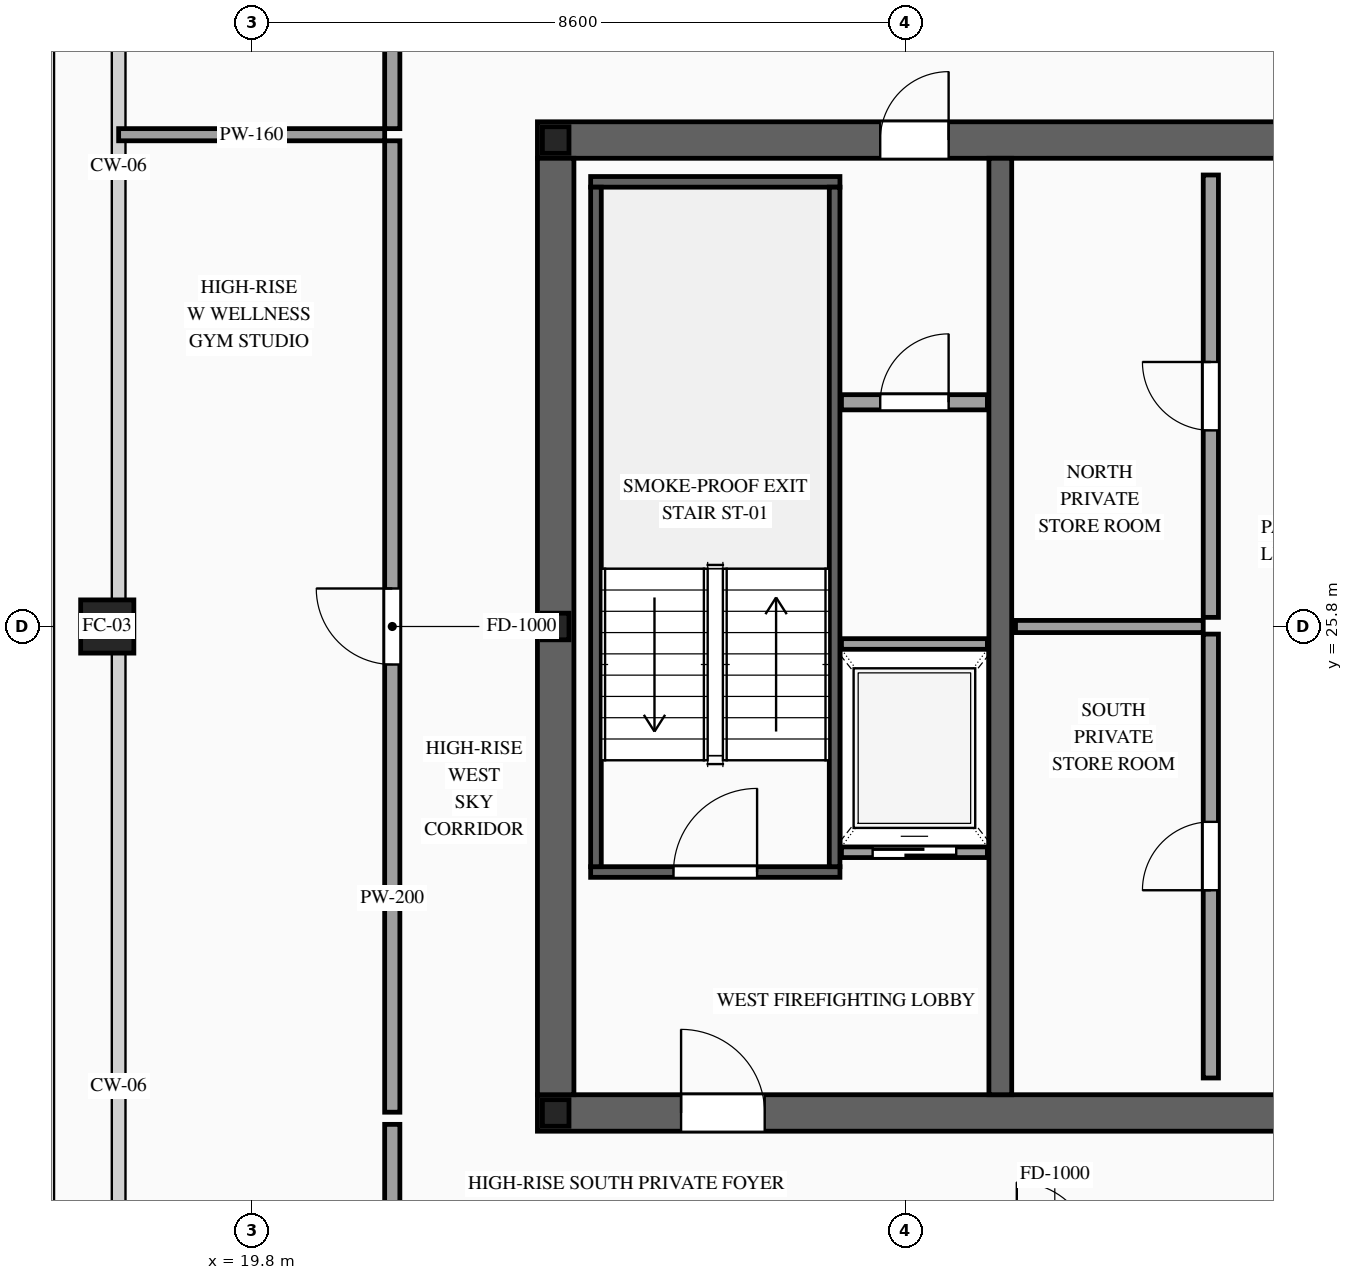
"""IFC4 building model, lengths in metres.
Left out: names, types, materials, properties, quantities, classifications, styles, units other than length and angle.
Written with IfcOpenShell. Run it as: python <this file> out.ifc"""

import sys

from ifc_helpers import new_model, si_unit, direction, frame, frame_2d, origin, origin_2d, place, context, subcontext, project, spatial, rectangle, hollow_rectangle, i_section, extrude, source, transform, mapped, element, fill, save


model = new_model("IFC4")
c1 = context("Model", 3, precision=1e-05, world=origin(), true_north=direction((0.0, 1.0)))
c2 = subcontext(c1, "Body", "Model", "MODEL_VIEW")
j1 = project(units=[si_unit("LENGTHUNIT", "METRE"), si_unit("PLANEANGLEUNIT", "RADIAN")], contexts=[c1])
p1 = place(None, origin())
s1 = spatial("IfcSite", under=j1, at=p1, CompositionType="ELEMENT")
p2 = place(p1, origin())
s2 = spatial("IfcBuilding", under=s1, at=p2, CompositionType="ELEMENT")
p3 = place(p2, frame((0.0, 0.0, 299.6)))
s3 = spatial("IfcBuildingStorey", under=s2, at=p3, CompositionType="ELEMENT", Elevation=299.6)
p4 = place(p3, frame((23.56, 19.4, 0.0), z_axis=(0.0, 0.0, 1.0), x_axis=(1.0, 0.0, 0.0)))
e1 = element("IfcWall", 1, at=p4, inside=s3, PredefinedType="SHEAR", context=c2, shape_type="SweptSolid", body=[
    extrude(rectangle(XDim=26.88, YDim=0.48, at=frame_2d((13.44, 0.0))), origin(), (0.0, 0.0, 1.0), 3.5),
])
p5 = place(p4, frame((1.89, 0.0, 0.0)))
e2 = element("IfcOpeningElement", 2, at=p5, cuts=e1, PredefinedType="OPENING", context=c2, shape_type="SweptSolid", body=[
    extrude(rectangle(XDim=1.1, YDim=2.2, at=frame_2d((0.55, 1.1))), frame((0.0, 0.255, 0.0), z_axis=(0.0, -1.0, 0.0), x_axis=(1.0, 0.0, 0.0)), (0.0, 0.0, 1.0), 0.51),
])
p6 = place(p4, frame((9.79, 0.0, 0.0)))
e3 = element("IfcOpeningElement", 3, at=p6, cuts=e1, PredefinedType="OPENING", context=c2, shape_type="SweptSolid", body=[
    extrude(rectangle(XDim=1.1, YDim=2.2, at=frame_2d((0.55, 1.1))), frame((0.0, 0.255, 0.0), z_axis=(0.0, -1.0, 0.0), x_axis=(1.0, 0.0, 0.0)), (0.0, 0.0, 1.0), 0.51),
])
p7 = place(p4, frame((22.99, 0.0, 0.0)))
e4 = element("IfcOpeningElement", 4, at=p7, cuts=e1, PredefinedType="OPENING", context=c2, shape_type="SweptSolid", body=[
    extrude(rectangle(XDim=1.1, YDim=2.2, at=frame_2d((0.55, 1.1))), frame((0.0, 0.255, 0.0), z_axis=(0.0, -1.0, 0.0), x_axis=(1.0, 0.0, 0.0)), (0.0, 0.0, 1.0), 0.51),
])
p8 = place(p4, frame((19.61, 0.0, 0.0)))
e5 = element("IfcOpeningElement", 5, at=p8, cuts=e1, PredefinedType="OPENING", context=c2, shape_type="SweptSolid", body=[
    extrude(rectangle(XDim=0.9, YDim=2.15, at=frame_2d((0.45, 1.075))), frame((0.0, 0.255, 0.0), z_axis=(0.0, -1.0, 0.0), x_axis=(1.0, 0.0, 0.0)), (0.0, 0.0, 1.0), 0.51),
])
p9 = place(p4, frame((18.17, 0.0, 0.0)))
e6 = element("IfcOpeningElement", 6, at=p9, cuts=e1, PredefinedType="OPENING", context=c2, shape_type="SweptSolid", body=[
    extrude(rectangle(XDim=0.9, YDim=2.15, at=frame_2d((0.45, 1.075))), frame((0.0, 0.255, 0.0), z_axis=(0.0, -1.0, 0.0), x_axis=(1.0, 0.0, 0.0)), (0.0, 0.0, 1.0), 0.51),
])
p10 = place(p3, frame((23.56, 32.2, 0.0), z_axis=(0.0, 0.0, 1.0), x_axis=(1.0, 0.0, 0.0)))
e7 = element("IfcWall", 7, at=p10, inside=s3, PredefinedType="SHEAR", context=c2, shape_type="SweptSolid", body=[
    extrude(rectangle(XDim=26.88, YDim=0.48, at=frame_2d((13.44, 0.0))), origin(), (0.0, 0.0, 1.0), 3.5),
])
p11 = place(p10, frame((4.51, 0.0, 0.0)))
e8 = element("IfcOpeningElement", 8, at=p11, cuts=e7, PredefinedType="OPENING", context=c2, shape_type="SweptSolid", body=[
    extrude(rectangle(XDim=0.9, YDim=2.15, at=frame_2d((0.45, 1.075))), frame((0.0, 0.255, 0.0), z_axis=(0.0, -1.0, 0.0), x_axis=(1.0, 0.0, 0.0)), (0.0, 0.0, 1.0), 0.51),
])
p12 = place(p10, frame((9.79, 0.0, 0.0)))
e9 = element("IfcOpeningElement", 9, at=p12, cuts=e7, PredefinedType="OPENING", context=c2, shape_type="SweptSolid", body=[
    extrude(rectangle(XDim=1.1, YDim=2.2, at=frame_2d((0.55, 1.1))), frame((0.0, 0.255, 0.0), z_axis=(0.0, -1.0, 0.0), x_axis=(1.0, 0.0, 0.0)), (0.0, 0.0, 1.0), 0.51),
])
p13 = place(p10, frame((15.64, 0.0, 0.0)))
e10 = element("IfcOpeningElement", 10, at=p13, cuts=e7, PredefinedType="OPENING", context=c2, shape_type="SweptSolid", body=[
    extrude(rectangle(XDim=1.1, YDim=2.2, at=frame_2d((0.55, 1.1))), frame((0.0, 0.255, 0.0), z_axis=(0.0, -1.0, 0.0), x_axis=(1.0, 0.0, 0.0)), (0.0, 0.0, 1.0), 0.51),
])
p14 = place(p10, frame((18.74, 0.0, 0.0)))
e11 = element("IfcOpeningElement", 11, at=p14, cuts=e7, PredefinedType="OPENING", context=c2, shape_type="SweptSolid", body=[
    extrude(rectangle(XDim=1.1, YDim=2.2, at=frame_2d((0.55, 1.1))), frame((0.0, 0.255, 0.0), z_axis=(0.0, -1.0, 0.0), x_axis=(1.0, 0.0, 0.0)), (0.0, 0.0, 1.0), 0.51),
])
m1 = source(origin(), c2, "Body", "SweptSolid", [
    extrude(rectangle(XDim=12.32, YDim=0.48, at=frame_2d((6.16, 0.0))), origin(), (0.0, 0.0, 1.0), 3.5),
])
p15 = place(p3, frame((23.8, 19.64, 0.0), z_axis=(0.0, 0.0, 1.0), x_axis=(0.0, 1.0, 0.0)))
e12 = element("IfcWall", 12, at=p15, inside=s3, PredefinedType="SHEAR", context=c2, shape_type="MappedRepresentation", body=[
    mapped(m1, transform((0.0, 0.0, 0.0), scale=1.0)),
])
m2 = source(origin(), c2, "Body", "SweptSolid", [
    extrude(rectangle(XDim=12.32, YDim=0.3, at=frame_2d((6.16, 0.0))), origin(), (0.0, 0.0, 1.0), 3.5),
])
p16 = place(p3, frame((29.65, 19.64, 0.0), z_axis=(0.0, 0.0, 1.0), x_axis=(0.0, 1.0, 0.0)))
e13 = element("IfcWall", 13, at=p16, inside=s3, PredefinedType="SOLIDWALL", context=c2, shape_type="MappedRepresentation", body=[
    mapped(m2, transform((0.0, 0.0, 0.0), scale=1.0)),
])
m3 = source(origin(), c2, "Body", "SweptSolid", [
    extrude(i_section(OverallWidth=0.35, OverallDepth=0.35, WebThickness=0.012, FlangeThickness=0.019, at=origin_2d()), origin(), (0.0, 0.0, 1.0), 3.5),
])
for number, where, z_axis, x_axis in (
    (14, (23.8, 19.4, 0.0), (0.0, 0.0, 1.0), (1.0, 0.0, 0.0)),
    (15, (23.8, 25.8, 0.0), (0.0, 0.0, 1.0), (1.0, 0.0, 0.0)),
    (16, (23.8, 32.2, 0.0), (0.0, 0.0, 1.0), (1.0, 0.0, 0.0)),
):
    element("IfcColumn", number, at=place(p3, frame(where, z_axis=z_axis, x_axis=x_axis)), inside=s3, PredefinedType="COLUMN", context=c2, shape_type="MappedRepresentation", body=[
        mapped(m3, transform((0.0, 0.0, 0.0), scale=1.0)),
    ])
m4 = source(origin(), c2, "Body", "SweptSolid", [
    extrude(hollow_rectangle(XDim=0.7, YDim=0.7, WallThickness=0.032, at=origin_2d()), origin(), (0.0, 0.0, 1.0), 3.5),
])
p17 = place(p3, frame((17.9, 25.8, 0.0), z_axis=(0.0, 0.0, 1.0), x_axis=(1.0, 0.0, 0.0)))
e17 = element("IfcColumn", 17, at=p17, inside=s3, PredefinedType="COLUMN", context=c2, shape_type="MappedRepresentation", body=[
    mapped(m4, transform((0.0, 0.0, 0.0), scale=1.0)),
])
p18 = place(p3, frame((27.56, 22.83, 0.0), z_axis=(0.0, 0.0, 1.0), x_axis=(1.0, 0.0, 0.0)))
e18 = element("IfcWall", 18, at=p18, inside=s3, PredefinedType="SOLIDWALL", context=c2, shape_type="SweptSolid", body=[
    extrude(rectangle(XDim=1.92, YDim=0.14, at=frame_2d((0.96, 0.0))), origin(), (0.0, 0.0, 1.0), 3.28),
])
p19 = place(p18, frame((0.41, 0.0, 0.0)))
e19 = element("IfcOpeningElement", 19, at=p19, cuts=e18, PredefinedType="OPENING", context=c2, shape_type="SweptSolid", body=[
    extrude(rectangle(XDim=1.1, YDim=2.2, at=frame_2d((0.55, 1.1))), frame((0.0, 0.085, 0.0), z_axis=(0.0, -1.0, 0.0), x_axis=(1.0, 0.0, 0.0)), (0.0, 0.0, 1.0), 0.17),
])
m5 = source(origin(), c2, "Body", "SweptSolid", [
    extrude(rectangle(XDim=1.92, YDim=0.14, at=frame_2d((0.96, 0.0))), origin(), (0.0, 0.0, 1.0), 3.28),
])
p20 = place(p3, frame((27.56, 25.57, 0.0), z_axis=(0.0, 0.0, 1.0), x_axis=(1.0, 0.0, 0.0)))
e20 = element("IfcWall", 20, at=p20, inside=s3, PredefinedType="SOLIDWALL", context=c2, shape_type="MappedRepresentation", body=[
    mapped(m5, transform((0.0, 0.0, 0.0), scale=1.0)),
])
p21 = place(p3, frame((24.26, 22.57, 0.0), z_axis=(0.0, 0.0, 1.0), x_axis=(1.0, 0.0, 0.0)))
e21 = element("IfcWall", 21, at=p21, inside=s3, PredefinedType="SOLIDWALL", context=c2, shape_type="SweptSolid", body=[
    extrude(rectangle(XDim=3.28, YDim=0.14, at=frame_2d((1.64, 0.0))), origin(), (0.0, 0.0, 1.0), 3.28),
])
p22 = place(p21, frame((1.09, 0.0, 0.0)))
e22 = element("IfcOpeningElement", 22, at=p22, cuts=e21, PredefinedType="OPENING", context=c2, shape_type="SweptSolid", body=[
    extrude(rectangle(XDim=1.1, YDim=2.2, at=frame_2d((0.55, 1.1))), frame((0.0, 0.085, 0.0), z_axis=(0.0, -1.0, 0.0), x_axis=(1.0, 0.0, 0.0)), (0.0, 0.0, 1.0), 0.17),
])
m6 = source(origin(), c2, "Body", "SweptSolid", [
    extrude(rectangle(XDim=3.28, YDim=0.14, at=frame_2d((1.64, 0.0))), origin(), (0.0, 0.0, 1.0), 3.28),
])
p23 = place(p3, frame((24.26, 31.65, 0.0), z_axis=(0.0, 0.0, 1.0), x_axis=(1.0, 0.0, 0.0)))
e23 = element("IfcWall", 23, at=p23, inside=s3, PredefinedType="SOLIDWALL", context=c2, shape_type="MappedRepresentation", body=[
    mapped(m6, transform((0.0, 0.0, 0.0), scale=1.0)),
])
m7 = source(origin(), c2, "Body", "SweptSolid", [
    extrude(rectangle(XDim=8.94, YDim=0.14, at=frame_2d((4.47, 0.0))), origin(), (0.0, 0.0, 1.0), 3.28),
])
for number, where, z_axis, x_axis in (
    (24, (24.33, 22.64, 0.0), (0.0, 0.0, 1.0), (0.0, 1.0, 0.0)),
    (25, (27.47, 22.64, 0.0), (0.0, 0.0, 1.0), (0.0, 1.0, 0.0)),
):
    element("IfcWall", number, at=place(p3, frame(where, z_axis=z_axis, x_axis=x_axis)), inside=s3, PredefinedType="SOLIDWALL", context=c2, shape_type="MappedRepresentation", body=[
        mapped(m7, transform((0.0, 0.0, 0.0), scale=1.0)),
    ])
p24 = place(p3, frame((27.56, 28.75, 0.0), z_axis=(0.0, 0.0, 1.0), x_axis=(1.0, 0.0, 0.0)))
e26 = element("IfcWall", 26, at=p24, inside=s3, PredefinedType="PARTITIONING", context=c2, shape_type="SweptSolid", body=[
    extrude(rectangle(XDim=1.92, YDim=0.2, at=frame_2d((0.96, 0.0))), origin(), (0.0, 0.0, 1.0), 3.28),
])
p25 = place(p24, frame((0.51, 0.0, 0.0)))
e27 = element("IfcOpeningElement", 27, at=p25, cuts=e26, PredefinedType="OPENING", context=c2, shape_type="SweptSolid", body=[
    extrude(rectangle(XDim=0.9, YDim=2.15, at=frame_2d((0.45, 1.075))), frame((0.0, 0.115, 0.0), z_axis=(0.0, -1.0, 0.0), x_axis=(1.0, 0.0, 0.0)), (0.0, 0.0, 1.0), 0.23),
])
p26 = place(p3, frame((32.42, 19.86, 0.0), z_axis=(0.0, 0.0, 1.0), x_axis=(0.0, 1.0, 0.0)))
e28 = element("IfcWall", 28, at=p26, inside=s3, PredefinedType="PARTITIONING", context=c2, shape_type="SweptSolid", body=[
    extrude(rectangle(XDim=5.84, YDim=0.2, at=frame_2d((2.92, 0.0))), origin(), (0.0, 0.0, 1.0), 3.28),
])
p27 = place(p26, frame((2.47, 0.0, 0.0)))
e29 = element("IfcOpeningElement", 29, at=p27, cuts=e28, PredefinedType="OPENING", context=c2, shape_type="SweptSolid", body=[
    extrude(rectangle(XDim=0.9, YDim=2.15, at=frame_2d((0.45, 1.075))), frame((0.0, 0.115, 0.0), z_axis=(0.0, -1.0, 0.0), x_axis=(1.0, 0.0, 0.0)), (0.0, 0.0, 1.0), 0.23),
])
p28 = place(p3, frame((32.42, 25.92, 0.0), z_axis=(0.0, 0.0, 1.0), x_axis=(0.0, 1.0, 0.0)))
e30 = element("IfcWall", 30, at=p28, inside=s3, PredefinedType="PARTITIONING", context=c2, shape_type="SweptSolid", body=[
    extrude(rectangle(XDim=5.82, YDim=0.2, at=frame_2d((2.91, 0.0))), origin(), (0.0, 0.0, 1.0), 3.28),
])
p29 = place(p28, frame((2.46, 0.0, 0.0)))
e31 = element("IfcOpeningElement", 31, at=p29, cuts=e30, PredefinedType="OPENING", context=c2, shape_type="SweptSolid", body=[
    extrude(rectangle(XDim=0.9, YDim=2.15, at=frame_2d((0.45, 1.075))), frame((0.0, 0.115, 0.0), z_axis=(0.0, -1.0, 0.0), x_axis=(1.0, 0.0, 0.0)), (0.0, 0.0, 1.0), 0.23),
])
m8 = source(origin(), c2, "Body", "SweptSolid", [
    extrude(rectangle(XDim=2.47, YDim=0.16, at=frame_2d((1.235, 0.0))), origin(), (0.0, 0.0, 1.0), 3.28),
])
p30 = place(p3, frame((29.85, 25.8, 0.0), z_axis=(0.0, 0.0, 1.0), x_axis=(1.0, 0.0, 0.0)))
e32 = element("IfcWall", 32, at=p30, inside=s3, PredefinedType="PARTITIONING", context=c2, shape_type="MappedRepresentation", body=[
    mapped(m8, transform((0.0, 0.0, 0.0), scale=1.0)),
])
m9 = source(origin(), c2, "Body", "SweptSolid", [
    extrude(rectangle(XDim=1.7, YDim=0.2, at=frame_2d((0.85, 0.0))), origin(), (0.0, 0.0, 1.0), 3.28),
])
for number, where, z_axis, x_axis in (
    (33, (21.65, 32.35, 0.0), (0.0, 0.0, 1.0), (0.0, 1.0, 0.0)),
    (34, (21.65, 17.55, 0.0), (0.0, 0.0, 1.0), (0.0, 1.0, 0.0)),
):
    element("IfcWall", number, at=place(p3, frame(where, z_axis=z_axis, x_axis=x_axis)), inside=s3, PredefinedType="PARTITIONING", context=c2, shape_type="MappedRepresentation", body=[
        mapped(m9, transform((0.0, 0.0, 0.0), scale=1.0)),
    ])
p31 = place(p3, frame((21.65, 19.41, 0.0), z_axis=(0.0, 0.0, 1.0), x_axis=(0.0, 1.0, 0.0)))
e35 = element("IfcWall", 35, at=p31, inside=s3, PredefinedType="PARTITIONING", context=c2, shape_type="SweptSolid", body=[
    extrude(rectangle(XDim=12.78, YDim=0.2, at=frame_2d((6.39, 0.0))), origin(), (0.0, 0.0, 1.0), 3.28),
])
p32 = place(p31, frame((5.89, 0.0, 0.0)))
e36 = element("IfcOpeningElement", 36, at=p32, cuts=e35, PredefinedType="OPENING", context=c2, shape_type="SweptSolid", body=[
    extrude(rectangle(XDim=1.0, YDim=2.2, at=frame_2d((0.5, 1.1))), frame((0.0, 0.115, 0.0), z_axis=(0.0, -1.0, 0.0), x_axis=(1.0, 0.0, 0.0)), (0.0, 0.0, 1.0), 0.23),
])
m10 = source(origin(), c2, "Body", "SweptSolid", [
    extrude(rectangle(XDim=3.5, YDim=0.16, at=frame_2d((1.75, 0.0))), origin(), (0.0, 0.0, 1.0), 2.825),
])
p33 = place(p3, frame((18.05, 32.27, 0.0), z_axis=(0.0, 0.0, 1.0), x_axis=(1.0, 0.0, 0.0)))
e37 = element("IfcWall", 37, at=p33, inside=s3, PredefinedType="PARTITIONING", context=c2, shape_type="MappedRepresentation", body=[
    mapped(m10, transform((0.0, 0.0, 0.0), scale=1.0)),
])
m11 = source(origin(), c2, "Body", "SweptSolid", [
    extrude(rectangle(XDim=1.1, YDim=2.2, at=frame_2d((0.55, 1.1))), frame((0.0, 0.025, 0.0), z_axis=(0.0, -1.0, 0.0), x_axis=(1.0, 0.0, 0.0)), (0.0, 0.0, 1.0), 0.05),
])
p34 = place(p19, origin())
e38 = element("IfcDoor", 38, at=p34, inside=s3, OperationType="SLIDING_TO_LEFT", PredefinedType="DOOR", context=c2, shape_type="MappedRepresentation", body=[
    mapped(m11, transform((0.0, 0.0, 0.0), scale=1.0)),
])
fill(e19, e38)
m12 = source(origin(), c2, "Body", "SweptSolid", [
    extrude(rectangle(XDim=1.1, YDim=2.2, at=frame_2d((0.55, 1.1))), frame((0.0, 0.025, 0.0), z_axis=(0.0, -1.0, 0.0), x_axis=(1.0, 0.0, 0.0)), (0.0, 0.0, 1.0), 0.05),
])
p35 = place(p22, origin())
e39 = element("IfcDoor", 39, at=p35, inside=s3, OperationType="SINGLE_SWING_RIGHT", PredefinedType="DOOR", context=c2, shape_type="MappedRepresentation", body=[
    mapped(m12, transform((0.0, 0.0, 0.0), scale=1.0)),
])
fill(e22, e39)
p36 = place(p5, origin())
e40 = element("IfcDoor", 40, at=p36, inside=s3, OperationType="SINGLE_SWING_LEFT", PredefinedType="DOOR", context=c2, shape_type="MappedRepresentation", body=[
    mapped(m12, transform((0.0, 0.0, 0.0), scale=1.0)),
])
fill(e2, e40)
m13 = source(origin(), c2, "Body", "SweptSolid", [
    extrude(rectangle(XDim=0.9, YDim=2.15, at=frame_2d((0.45, 1.075))), frame((0.0, 0.025, 0.0), z_axis=(0.0, -1.0, 0.0), x_axis=(1.0, 0.0, 0.0)), (0.0, 0.0, 1.0), 0.05),
])
p37 = place(p11, origin())
e41 = element("IfcDoor", 41, at=p37, inside=s3, OperationType="SINGLE_SWING_RIGHT", PredefinedType="DOOR", context=c2, shape_type="MappedRepresentation", body=[
    mapped(m13, transform((0.0, 0.0, 0.0), scale=1.0)),
])
fill(e8, e41)
p38 = place(p25, origin())
e42 = element("IfcDoor", 42, at=p38, inside=s3, OperationType="SINGLE_SWING_RIGHT", PredefinedType="DOOR", context=c2, shape_type="MappedRepresentation", body=[
    mapped(m13, transform((0.0, 0.0, 0.0), scale=1.0)),
])
fill(e27, e42)
p39 = place(p27, origin())
e43 = element("IfcDoor", 43, at=p39, inside=s3, OperationType="SINGLE_SWING_LEFT", PredefinedType="DOOR", context=c2, shape_type="MappedRepresentation", body=[
    mapped(m13, transform((0.0, 0.0, 0.0), scale=1.0)),
])
fill(e29, e43)
p40 = place(p29, origin())
e44 = element("IfcDoor", 44, at=p40, inside=s3, OperationType="SINGLE_SWING_RIGHT", PredefinedType="DOOR", context=c2, shape_type="MappedRepresentation", body=[
    mapped(m13, transform((0.0, 0.0, 0.0), scale=1.0)),
])
fill(e31, e44)
m14 = source(origin(), c2, "Body", "SweptSolid", [
    extrude(rectangle(XDim=1.0, YDim=2.2, at=frame_2d((0.5, 1.1))), frame((0.0, 0.025, 0.0), z_axis=(0.0, -1.0, 0.0), x_axis=(1.0, 0.0, 0.0)), (0.0, 0.0, 1.0), 0.05),
])
p41 = place(p32, origin())
e45 = element("IfcDoor", 45, at=p41, inside=s3, OperationType="SINGLE_SWING_RIGHT", PredefinedType="DOOR", context=c2, shape_type="MappedRepresentation", body=[
    mapped(m14, transform((0.0, 0.0, 0.0), scale=1.0)),
])
fill(e36, e45)
save(model, sys.argv[1])
